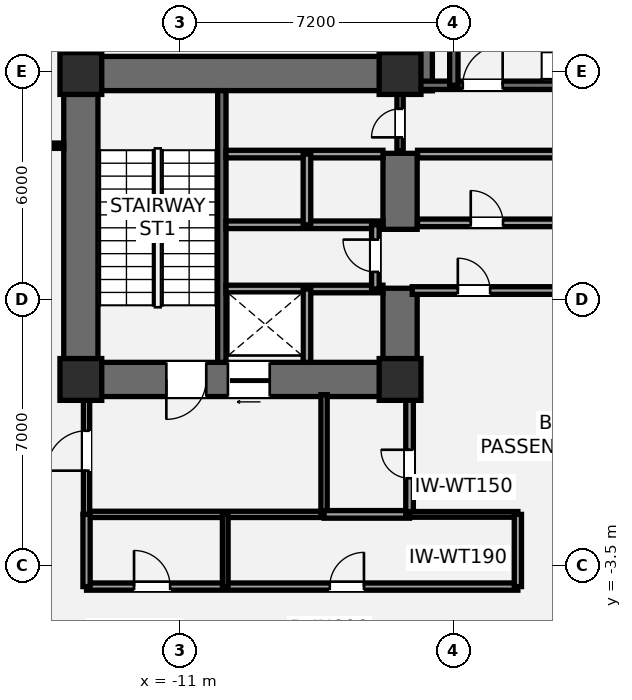
"""IFC4 building model, lengths in metres.
Left out: names, types, materials, properties, quantities, classifications, styles, units other than length and angle.
Written with IfcOpenShell. Run it as: python <this file> out.ifc"""

import sys

from ifc_helpers import new_model, si_unit, direction, frame, frame_2d, origin, origin_2d, place, context, subcontext, project, spatial, rectangle, extrude, element, fill, save


model = new_model("IFC4")
c1 = context("Model", 3, precision=1e-05, world=origin(), true_north=direction((0.0, 1.0)))
c2 = subcontext(c1, "Body", "Model", "MODEL_VIEW")
j1 = project(units=[si_unit("LENGTHUNIT", "METRE"), si_unit("PLANEANGLEUNIT", "RADIAN")], contexts=[c1])
p1 = place(None, origin())
s1 = spatial("IfcSite", under=j1, at=p1, CompositionType="ELEMENT")
p2 = place(p1, origin())
s2 = spatial("IfcBuilding", under=s1, at=p2, CompositionType="ELEMENT")
p3 = place(p2, frame((0.0, 0.0, -8.8)))
s3 = spatial("IfcBuildingStorey", under=s2, at=p3, CompositionType="ELEMENT", Elevation=-8.8)
p4 = place(p3, frame((-13.6, 0.95, 0.0), z_axis=(0.0, 0.0, 1.0), x_axis=(0.0, 1.0, 0.0)))
e1 = element("IfcWall", 1, at=p4, inside=s3, PredefinedType="SHEAR", context=c2, shape_type="SweptSolid", body=[
    extrude(rectangle(XDim=8.95, YDim=0.9, at=frame_2d((4.475, 0.0))), origin(), (0.0, 0.0, 1.0), 4.4),
])
p5 = place(p3, frame((-14.05, 9.45, 0.0), z_axis=(0.0, 0.0, 1.0), x_axis=(1.0, 0.0, 0.0)))
e2 = element("IfcWall", 2, at=p5, inside=s3, PredefinedType="SHEAR", context=c2, shape_type="SweptSolid", body=[
    extrude(rectangle(XDim=9.7, YDim=0.9, at=frame_2d((4.85, 0.0))), origin(), (0.0, 0.0, 1.0), 4.4),
])
p6 = place(p3, frame((-4.75, 1.4, 0.0), z_axis=(0.0, 0.0, 1.0), x_axis=(-1.0, 0.0, 0.0)))
e3 = element("IfcWall", 3, at=p6, inside=s3, PredefinedType="SHEAR", context=c2, shape_type="SweptSolid", body=[
    extrude(rectangle(XDim=9.3, YDim=0.9, at=frame_2d((4.65, 0.0))), origin(), (0.0, 0.0, 1.0), 4.4),
])
p7 = place(p6, frame((5.55, 0.0, 0.0)))
e4 = element("IfcOpeningElement", 4, at=p7, cuts=e3, PredefinedType="OPENING", context=c2, shape_type="SweptSolid", body=[
    extrude(rectangle(XDim=1.05, YDim=2.15, at=frame_2d((0.525, 1.075))), frame((0.0, 0.46, 0.0), z_axis=(0.0, -1.0, 0.0), x_axis=(1.0, 0.0, 0.0)), (0.0, 0.0, 1.0), 0.92),
])
p8 = place(p6, frame((3.88, 0.0, 0.0)))
e5 = element("IfcOpeningElement", 5, at=p8, cuts=e3, PredefinedType="OPENING", context=c2, shape_type="SweptSolid", body=[
    extrude(rectangle(XDim=1.1, YDim=2.2, at=frame_2d((0.55, 1.1))), frame((0.0, 0.46, 0.0), z_axis=(0.0, -1.0, 0.0), x_axis=(1.0, 0.0, 0.0)), (0.0, 0.0, 1.0), 0.92),
])
p9 = place(p3, frame((-5.2, 0.95, 0.0), z_axis=(0.0, 0.0, 1.0), x_axis=(0.0, 1.0, 0.0)))
e6 = element("IfcWall", 6, at=p9, inside=s3, PredefinedType="SHEAR", context=c2, shape_type="SweptSolid", body=[
    extrude(rectangle(XDim=2.85, YDim=0.9, at=frame_2d((1.425, 0.0))), origin(), (0.0, 0.0, 1.0), 4.4),
])
p10 = place(p3, frame((-5.2, 5.35, 0.0), z_axis=(0.0, 0.0, 1.0), x_axis=(0.0, 1.0, 0.0)))
e7 = element("IfcWall", 7, at=p10, inside=s3, PredefinedType="SHEAR", context=c2, shape_type="SweptSolid", body=[
    extrude(rectangle(XDim=2.0, YDim=0.9, at=frame_2d((1.0, 0.0))), origin(), (0.0, 0.0, 1.0), 4.4),
])
p11 = place(p3, frame((-9.89, 1.85, 0.0), z_axis=(0.0, 0.0, 1.0), x_axis=(0.0, 1.0, 0.0)))
e8 = element("IfcWall", 8, at=p11, inside=s3, PredefinedType="SHEAR", context=c2, shape_type="SweptSolid", body=[
    extrude(rectangle(XDim=7.15, YDim=0.22, at=frame_2d((3.575, 0.0))), origin(), (0.0, 0.0, 1.0), 4.4),
])
p12 = place(p3, frame((-4.8, 9.0, 0.0), z_axis=(0.0, 0.0, 1.0), x_axis=(0.0, 1.0, 0.0)))
e9 = element("IfcWall", 9, at=p12, inside=s3, PredefinedType="SHEAR", context=c2, shape_type="SweptSolid", body=[
    extrude(rectangle(XDim=4.3, YDim=0.9, at=frame_2d((2.15, 0.0))), origin(), (0.0, 0.0, 1.0), 4.4),
])
p13 = place(p3, frame((-4.7, 9.14, 0.0), z_axis=(0.0, 0.0, 1.0), x_axis=(1.0, 0.0, 0.0)))
e10 = element("IfcWall", 10, at=p13, inside=s3, PredefinedType="SHEAR", context=c2, shape_type="SweptSolid", body=[
    extrude(rectangle(XDim=9.3, YDim=0.22, at=frame_2d((4.65, 0.0))), origin(), (0.0, 0.0, 1.0), 4.4),
])
p14 = place(p13, frame((1.15, 0.0, 0.0)))
e11 = element("IfcOpeningElement", 11, at=p14, cuts=e10, PredefinedType="OPENING", context=c2, shape_type="SweptSolid", body=[
    extrude(rectangle(XDim=1.05, YDim=2.15, at=frame_2d((0.525, 1.075))), frame((0.0, 0.12, 0.0), z_axis=(0.0, -1.0, 0.0), x_axis=(1.0, 0.0, 0.0)), (0.0, 0.0, 1.0), 0.24),
])
p15 = place(p3, frame((-3.785, 9.14, 0.0), z_axis=(0.0, 0.0, 1.0), x_axis=(0.0, 1.0, 0.0)))
e12 = element("IfcWall", 12, at=p15, inside=s3, PredefinedType="SHEAR", context=c2, shape_type="SweptSolid", body=[
    extrude(rectangle(XDim=3.26, YDim=0.22, at=frame_2d((1.63, 0.0))), origin(), (0.0, 0.0, 1.0), 4.4),
])
for number, where, z_axis, x_axis in (
    (13, (-13.6, 1.4, 0.0), (0.0, 0.0, 1.0), (1.0, 0.0, 0.0)),
    (14, (-13.6, 9.45, 0.0), (0.0, 0.0, 1.0), (1.0, 0.0, 0.0)),
    (15, (-5.2, 1.4, 0.0), (0.0, 0.0, 1.0), (1.0, 0.0, 0.0)),
    (16, (-5.2, 9.45, 0.0), (0.0, 0.0, 1.0), (1.0, 0.0, 0.0)),
):
    element("IfcColumn", number, at=place(p3, frame(where, z_axis=z_axis, x_axis=x_axis)), inside=s3, PredefinedType="COLUMN", context=c2, shape_type="SweptSolid", body=[
        extrude(rectangle(XDim=1.1, YDim=1.1, at=origin_2d()), origin(), (0.0, 0.0, 1.0), 4.4),
    ])
p16 = place(p3, frame((-13.45, -2.15, 0.0), z_axis=(0.0, 0.0, 1.0), x_axis=(1.0, 0.0, 0.0)))
e17 = element("IfcWall", 17, at=p16, inside=s3, PredefinedType="PARTITIONING", context=c2, shape_type="SweptSolid", body=[
    extrude(rectangle(XDim=6.25, YDim=0.165, at=frame_2d((3.125, 0.0))), origin(), (0.0, 0.0, 1.0), 4.14),
])
p17 = place(p3, frame((-13.45, -2.15, 0.0), z_axis=(0.0, 0.0, 1.0), x_axis=(0.0, 1.0, 0.0)))
e18 = element("IfcWall", 18, at=p17, inside=s3, PredefinedType="PARTITIONING", context=c2, shape_type="SweptSolid", body=[
    extrude(rectangle(XDim=3.15, YDim=0.165, at=frame_2d((1.575, 0.0))), origin(), (0.0, 0.0, 1.0), 4.14),
])
p18 = place(p17, frame((1.15, 0.0, 0.0)))
e19 = element("IfcOpeningElement", 19, at=p18, cuts=e18, PredefinedType="OPENING", context=c2, shape_type="SweptSolid", body=[
    extrude(rectangle(XDim=1.05, YDim=2.15, at=frame_2d((0.525, 1.075))), frame((0.0, 0.093, 0.0), z_axis=(0.0, -1.0, 0.0), x_axis=(1.0, 0.0, 0.0)), (0.0, 0.0, 1.0), 0.185),
])
p19 = place(p3, frame((-7.2, -2.15, 0.0), z_axis=(0.0, 0.0, 1.0), x_axis=(0.0, 1.0, 0.0)))
e20 = element("IfcWall", 20, at=p19, inside=s3, PredefinedType="PARTITIONING", context=c2, shape_type="SweptSolid", body=[
    extrude(rectangle(XDim=3.15, YDim=0.165, at=frame_2d((1.575, 0.0))), origin(), (0.0, 0.0, 1.0), 4.14),
])
p20 = place(p3, frame((-7.2, -2.15, 0.0), z_axis=(0.0, 0.0, 1.0), x_axis=(1.0, 0.0, 0.0)))
e21 = element("IfcWall", 21, at=p20, inside=s3, PredefinedType="SOLIDWALL", context=c2, shape_type="SweptSolid", body=[
    extrude(rectangle(XDim=2.25, YDim=0.2, at=frame_2d((1.125, 0.0))), origin(), (0.0, 0.0, 1.0), 4.14),
])
p21 = place(p3, frame((-4.95, -2.15, 0.0), z_axis=(0.0, 0.0, 1.0), x_axis=(0.0, 1.0, 0.0)))
e22 = element("IfcWall", 22, at=p21, inside=s3, PredefinedType="SOLIDWALL", context=c2, shape_type="SweptSolid", body=[
    extrude(rectangle(XDim=3.15, YDim=0.2, at=frame_2d((1.575, 0.0))), origin(), (0.0, 0.0, 1.0), 3.508),
])
p22 = place(p21, frame((0.95, 0.0, 0.0)))
e23 = element("IfcOpeningElement", 23, at=p22, cuts=e22, PredefinedType="OPENING", context=c2, shape_type="SweptSolid", body=[
    extrude(rectangle(XDim=0.75, YDim=2.1, at=frame_2d((0.375, 1.05))), frame((0.0, 0.11, 0.0), z_axis=(0.0, -1.0, 0.0), x_axis=(1.0, 0.0, 0.0)), (0.0, 0.0, 1.0), 0.22),
])
p23 = place(p3, frame((-9.78, 3.78, 0.0), z_axis=(0.0, 0.0, 1.0), x_axis=(1.0, 0.0, 0.0)))
e24 = element("IfcWall", 24, at=p23, inside=s3, PredefinedType="SOLIDWALL", context=c2, shape_type="SweptSolid", body=[
    extrude(rectangle(XDim=4.13, YDim=0.2, at=frame_2d((2.065, 0.0))), origin(), (0.0, 0.0, 1.0), 4.14),
])
p24 = place(p3, frame((-7.65, 1.85, 0.0), z_axis=(0.0, 0.0, 1.0), x_axis=(0.0, 1.0, 0.0)))
e25 = element("IfcWall", 25, at=p24, inside=s3, PredefinedType="SOLIDWALL", context=c2, shape_type="SweptSolid", body=[
    extrude(rectangle(XDim=1.93, YDim=0.2, at=frame_2d((0.965, 0.0))), origin(), (0.0, 0.0, 1.0), 4.14),
])
for number, where, z_axis, x_axis in (
    (26, (-9.78, 5.47, 0.0), (0.0, 0.0, 1.0), (1.0, 0.0, 0.0)),
    (27, (-9.78, 7.33, 0.0), (0.0, 0.0, 1.0), (1.0, 0.0, 0.0)),
):
    element("IfcWall", number, at=place(p3, frame(where, z_axis=z_axis, x_axis=x_axis)), inside=s3, PredefinedType="SOLIDWALL", context=c2, shape_type="SweptSolid", body=[
        extrude(rectangle(XDim=4.13, YDim=0.2, at=frame_2d((2.065, 0.0))), origin(), (0.0, 0.0, 1.0), 4.14),
    ])
p25 = place(p3, frame((-7.65, 5.47, 0.0), z_axis=(0.0, 0.0, 1.0), x_axis=(0.0, 1.0, 0.0)))
e28 = element("IfcWall", 28, at=p25, inside=s3, PredefinedType="SOLIDWALL", context=c2, shape_type="SweptSolid", body=[
    extrude(rectangle(XDim=1.86, YDim=0.2, at=frame_2d((0.93, 0.0))), origin(), (0.0, 0.0, 1.0), 4.14),
])
p26 = place(p3, frame((-5.85, 3.78, 0.0), z_axis=(0.0, 0.0, 1.0), x_axis=(0.0, 1.0, 0.0)))
e29 = element("IfcWall", 29, at=p26, inside=s3, PredefinedType="SOLIDWALL", context=c2, shape_type="SweptSolid", body=[
    extrude(rectangle(XDim=1.69, YDim=0.2, at=frame_2d((0.845, 0.0))), origin(), (0.0, 0.0, 1.0), 4.14),
])
p27 = place(p26, frame((0.45, 0.0, 0.0)))
e30 = element("IfcOpeningElement", 30, at=p27, cuts=e29, PredefinedType="OPENING", context=c2, shape_type="SweptSolid", body=[
    extrude(rectangle(XDim=0.85, YDim=2.1, at=frame_2d((0.425, 1.05))), frame((0.0, 0.11, 0.0), z_axis=(0.0, -1.0, 0.0), x_axis=(1.0, 0.0, 0.0)), (0.0, 0.0, 1.0), 0.22),
])
p28 = place(p3, frame((-4.88, 3.74, 0.0), z_axis=(0.0, 0.0, 1.0), x_axis=(1.0, 0.0, 0.0)))
e31 = element("IfcWall", 31, at=p28, inside=s3, PredefinedType="SOLIDWALL", context=c2, shape_type="SweptSolid", body=[
    extrude(rectangle(XDim=4.0, YDim=0.2, at=frame_2d((2.0, 0.0))), origin(), (0.0, 0.0, 1.0), 4.14),
])
p29 = place(p28, frame((1.2, 0.0, 0.0)))
e32 = element("IfcOpeningElement", 32, at=p29, cuts=e31, PredefinedType="OPENING", context=c2, shape_type="SweptSolid", body=[
    extrude(rectangle(XDim=0.85, YDim=2.1, at=frame_2d((0.425, 1.05))), frame((0.0, 0.11, 0.0), z_axis=(0.0, -1.0, 0.0), x_axis=(1.0, 0.0, 0.0)), (0.0, 0.0, 1.0), 0.22),
])
p30 = place(p3, frame((-4.74, 5.52, 0.0), z_axis=(0.0, 0.0, 1.0), x_axis=(1.0, 0.0, 0.0)))
e33 = element("IfcWall", 33, at=p30, inside=s3, PredefinedType="SOLIDWALL", context=c2, shape_type="SweptSolid", body=[
    extrude(rectangle(XDim=3.86, YDim=0.2, at=frame_2d((1.93, 0.0))), origin(), (0.0, 0.0, 1.0), 4.14),
])
p31 = place(p30, frame((1.4, 0.0, 0.0)))
e34 = element("IfcOpeningElement", 34, at=p31, cuts=e33, PredefinedType="OPENING", context=c2, shape_type="SweptSolid", body=[
    extrude(rectangle(XDim=0.85, YDim=2.1, at=frame_2d((0.425, 1.05))), frame((0.0, 0.11, 0.0), z_axis=(0.0, -1.0, 0.0), x_axis=(1.0, 0.0, 0.0)), (0.0, 0.0, 1.0), 0.22),
])
p32 = place(p3, frame((-4.74, 7.33, 0.0), z_axis=(0.0, 0.0, 1.0), x_axis=(1.0, 0.0, 0.0)))
e35 = element("IfcWall", 35, at=p32, inside=s3, PredefinedType="SOLIDWALL", context=c2, shape_type="SweptSolid", body=[
    extrude(rectangle(XDim=3.86, YDim=0.2, at=frame_2d((1.93, 0.0))), origin(), (0.0, 0.0, 1.0), 4.14),
])
p33 = place(p3, frame((-5.2, 7.42, 0.0), z_axis=(0.0, 0.0, 1.0), x_axis=(0.0, 1.0, 0.0)))
e36 = element("IfcWall", 36, at=p33, inside=s3, PredefinedType="PARTITIONING", context=c2, shape_type="SweptSolid", body=[
    extrude(rectangle(XDim=1.58, YDim=0.165, at=frame_2d((0.79, 0.0))), origin(), (0.0, 0.0, 1.0), 4.14),
])
p34 = place(p33, frame((0.35, 0.0, 0.0)))
e37 = element("IfcOpeningElement", 37, at=p34, cuts=e36, PredefinedType="OPENING", context=c2, shape_type="SweptSolid", body=[
    extrude(rectangle(XDim=0.75, YDim=2.1, at=frame_2d((0.375, 1.05))), frame((0.0, 0.093, 0.0), z_axis=(0.0, -1.0, 0.0), x_axis=(1.0, 0.0, 0.0)), (0.0, 0.0, 1.0), 0.185),
])
p35 = place(p3, frame((-13.45, -4.05, 0.0), z_axis=(0.0, 0.0, 1.0), x_axis=(1.0, 0.0, 0.0)))
e38 = element("IfcWall", 38, at=p35, inside=s3, PredefinedType="PLUMBINGWALL", context=c2, shape_type="SweptSolid", body=[
    extrude(rectangle(XDim=11.35, YDim=0.19, at=frame_2d((5.675, 0.0))), origin(), (0.0, 0.0, 1.0), 3.667),
])
p36 = place(p35, frame((1.25, 0.0, 0.0)))
e39 = element("IfcOpeningElement", 39, at=p36, cuts=e38, PredefinedType="OPENING", context=c2, shape_type="SweptSolid", body=[
    extrude(rectangle(XDim=0.95, YDim=2.15, at=frame_2d((0.475, 1.075))), frame((0.0, 0.105, 0.0), z_axis=(0.0, -1.0, 0.0), x_axis=(1.0, 0.0, 0.0)), (0.0, 0.0, 1.0), 0.21),
])
p37 = place(p35, frame((6.4, 0.0, 0.0)))
e40 = element("IfcOpeningElement", 40, at=p37, cuts=e38, PredefinedType="OPENING", context=c2, shape_type="SweptSolid", body=[
    extrude(rectangle(XDim=0.9, YDim=2.1, at=frame_2d((0.45, 1.05))), frame((0.0, 0.105, 0.0), z_axis=(0.0, -1.0, 0.0), x_axis=(1.0, 0.0, 0.0)), (0.0, 0.0, 1.0), 0.21),
])
p38 = place(p3, frame((-4.95, -2.15, 0.0), z_axis=(0.0, 0.0, 1.0), x_axis=(1.0, 0.0, 0.0)))
e41 = element("IfcWall", 41, at=p38, inside=s3, PredefinedType="PLUMBINGWALL", context=c2, shape_type="SweptSolid", body=[
    extrude(rectangle(XDim=2.85, YDim=0.15, at=frame_2d((1.425, 0.0))), origin(), (0.0, 0.0, 1.0), 4.14),
])
for number, where, z_axis, x_axis in (
    (42, (-13.45, -4.05, 0.0), (0.0, 0.0, 1.0), (0.0, 1.0, 0.0)),
    (43, (-2.1, -4.05, 0.0), (0.0, 0.0, 1.0), (0.0, 1.0, 0.0)),
):
    element("IfcWall", number, at=place(p3, frame(where, z_axis=z_axis, x_axis=x_axis)), inside=s3, PredefinedType="PLUMBINGWALL", context=c2, shape_type="SweptSolid", body=[
        extrude(rectangle(XDim=1.9, YDim=0.19, at=frame_2d((0.95, 0.0))), origin(), (0.0, 0.0, 1.0), 4.14),
    ])
p39 = place(p3, frame((-9.8, -4.05, 0.0), z_axis=(0.0, 0.0, 1.0), x_axis=(0.0, 1.0, 0.0)))
e44 = element("IfcWall", 44, at=p39, inside=s3, PredefinedType="PLUMBINGWALL", context=c2, shape_type="SweptSolid", body=[
    extrude(rectangle(XDim=1.9, YDim=0.15, at=frame_2d((0.95, 0.0))), origin(), (0.0, 0.0, 1.0), 4.14),
])
p40 = place(p3, frame((-17.2, 7.55, 0.0), z_axis=(0.0, 0.0, 1.0), x_axis=(1.0, 0.0, 0.0)))
e45 = element("IfcWall", 45, at=p40, inside=s3, PredefinedType="PARTITIONING", context=c2, shape_type="SweptSolid", body=[
    extrude(rectangle(XDim=3.15, YDim=0.14, at=frame_2d((1.575, 0.0))), origin(), (0.0, 0.0, 1.0), 4.14),
])
p41 = place(p40, frame((0.32, 0.0, 0.0)))
e46 = element("IfcOpeningElement", 46, at=p41, cuts=e45, PredefinedType="OPENING", context=c2, shape_type="SweptSolid", body=[
    extrude(rectangle(XDim=0.92, YDim=2.15, at=frame_2d((0.46, 1.075))), frame((0.0, 0.08, 0.0), z_axis=(0.0, -1.0, 0.0), x_axis=(1.0, 0.0, 0.0)), (0.0, 0.0, 1.0), 0.16),
])
p42 = place(p7, origin())
e47 = element("IfcDoor", 47, at=p42, inside=s3, OperationType="SINGLE_SWING_RIGHT", PredefinedType="DOOR", context=c2, shape_type="SweptSolid", body=[
    extrude(rectangle(XDim=1.05, YDim=2.15, at=frame_2d((0.525, 1.075))), frame((0.0, 0.025, 0.0), z_axis=(0.0, -1.0, 0.0), x_axis=(1.0, 0.0, 0.0)), (0.0, 0.0, 1.0), 0.05),
])
fill(e4, e47)
p43 = place(p14, origin())
e48 = element("IfcDoor", 48, at=p43, inside=s3, OperationType="SINGLE_SWING_RIGHT", PredefinedType="DOOR", context=c2, shape_type="SweptSolid", body=[
    extrude(rectangle(XDim=1.05, YDim=2.15, at=frame_2d((0.525, 1.075))), frame((0.0, 0.025, 0.0), z_axis=(0.0, -1.0, 0.0), x_axis=(1.0, 0.0, 0.0)), (0.0, 0.0, 1.0), 0.05),
])
fill(e11, e48)
p44 = place(p18, origin())
e49 = element("IfcDoor", 49, at=p44, inside=s3, OperationType="SINGLE_SWING_LEFT", PredefinedType="DOOR", context=c2, shape_type="SweptSolid", body=[
    extrude(rectangle(XDim=1.05, YDim=2.15, at=frame_2d((0.525, 1.075))), frame((0.0, 0.025, 0.0), z_axis=(0.0, -1.0, 0.0), x_axis=(1.0, 0.0, 0.0)), (0.0, 0.0, 1.0), 0.05),
])
fill(e19, e49)
p45 = place(p22, origin())
e50 = element("IfcDoor", 50, at=p45, inside=s3, OperationType="SINGLE_SWING_RIGHT", PredefinedType="DOOR", context=c2, shape_type="SweptSolid", body=[
    extrude(rectangle(XDim=0.75, YDim=2.1, at=frame_2d((0.375, 1.05))), frame((0.0, 0.025, 0.0), z_axis=(0.0, -1.0, 0.0), x_axis=(1.0, 0.0, 0.0)), (0.0, 0.0, 1.0), 0.05),
])
fill(e23, e50)
p46 = place(p8, origin())
e51 = element("IfcDoor", 51, at=p46, inside=s3, OperationType="SLIDING_TO_LEFT", PredefinedType="DOOR", context=c2, shape_type="SweptSolid", body=[
    extrude(rectangle(XDim=1.1, YDim=2.2, at=frame_2d((0.55, 1.1))), frame((0.0, 0.025, 0.0), z_axis=(0.0, -1.0, 0.0), x_axis=(1.0, 0.0, 0.0)), (0.0, 0.0, 1.0), 0.05),
])
fill(e5, e51)
p47 = place(p27, origin())
e52 = element("IfcDoor", 52, at=p47, inside=s3, OperationType="SINGLE_SWING_RIGHT", PredefinedType="DOOR", context=c2, shape_type="SweptSolid", body=[
    extrude(rectangle(XDim=0.85, YDim=2.1, at=frame_2d((0.425, 1.05))), frame((0.0, 0.025, 0.0), z_axis=(0.0, -1.0, 0.0), x_axis=(1.0, 0.0, 0.0)), (0.0, 0.0, 1.0), 0.05),
])
fill(e30, e52)
p48 = place(p29, origin())
e53 = element("IfcDoor", 53, at=p48, inside=s3, OperationType="SINGLE_SWING_LEFT", PredefinedType="DOOR", context=c2, shape_type="SweptSolid", body=[
    extrude(rectangle(XDim=0.85, YDim=2.1, at=frame_2d((0.425, 1.05))), frame((0.0, 0.025, 0.0), z_axis=(0.0, -1.0, 0.0), x_axis=(1.0, 0.0, 0.0)), (0.0, 0.0, 1.0), 0.05),
])
fill(e32, e53)
p49 = place(p31, origin())
e54 = element("IfcDoor", 54, at=p49, inside=s3, OperationType="SINGLE_SWING_LEFT", PredefinedType="DOOR", context=c2, shape_type="SweptSolid", body=[
    extrude(rectangle(XDim=0.85, YDim=2.1, at=frame_2d((0.425, 1.05))), frame((0.0, 0.025, 0.0), z_axis=(0.0, -1.0, 0.0), x_axis=(1.0, 0.0, 0.0)), (0.0, 0.0, 1.0), 0.05),
])
fill(e34, e54)
p50 = place(p34, origin())
e55 = element("IfcDoor", 55, at=p50, inside=s3, OperationType="SINGLE_SWING_LEFT", PredefinedType="DOOR", context=c2, shape_type="SweptSolid", body=[
    extrude(rectangle(XDim=0.75, YDim=2.1, at=frame_2d((0.375, 1.05))), frame((0.0, 0.025, 0.0), z_axis=(0.0, -1.0, 0.0), x_axis=(1.0, 0.0, 0.0)), (0.0, 0.0, 1.0), 0.05),
])
fill(e37, e55)
p51 = place(p36, origin())
e56 = element("IfcDoor", 56, at=p51, inside=s3, OperationType="SINGLE_SWING_LEFT", PredefinedType="DOOR", context=c2, shape_type="SweptSolid", body=[
    extrude(rectangle(XDim=0.95, YDim=2.15, at=frame_2d((0.475, 1.075))), frame((0.0, 0.025, 0.0), z_axis=(0.0, -1.0, 0.0), x_axis=(1.0, 0.0, 0.0)), (0.0, 0.0, 1.0), 0.05),
])
fill(e39, e56)
p52 = place(p37, origin())
e57 = element("IfcDoor", 57, at=p52, inside=s3, OperationType="SINGLE_SWING_RIGHT", PredefinedType="DOOR", context=c2, shape_type="SweptSolid", body=[
    extrude(rectangle(XDim=0.9, YDim=2.1, at=frame_2d((0.45, 1.05))), frame((0.0, 0.025, 0.0), z_axis=(0.0, -1.0, 0.0), x_axis=(1.0, 0.0, 0.0)), (0.0, 0.0, 1.0), 0.05),
])
fill(e40, e57)
save(model, sys.argv[1])
